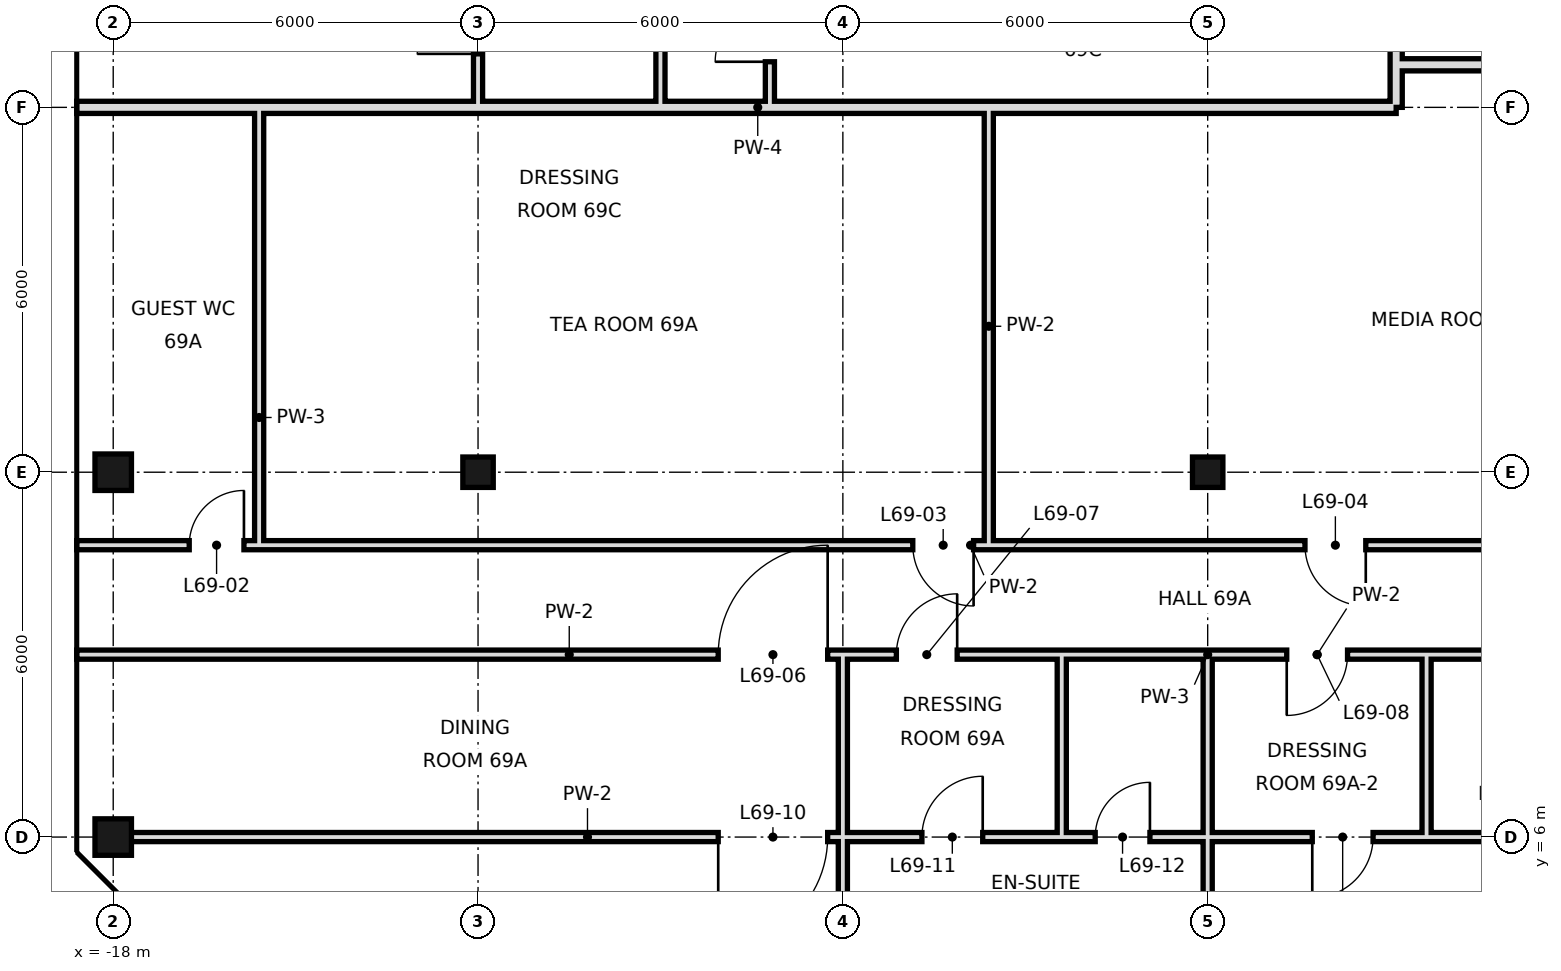
"""IFC4 building model, lengths in metres.
Left out: names, types, materials, properties, quantities, classifications, styles, units other than length and angle.
Written with IfcOpenShell. Run it as: python <this file> out.ifc"""

import sys

from ifc_helpers import new_model, si_unit, direction, frame, frame_2d, origin, origin_2d, place, context, subcontext, project, spatial, rectangle, hollow_rectangle, extrude, element, fill, save


model = new_model("IFC4")
c1 = context("Model", 3, precision=1e-05, world=origin(), true_north=direction((0.0, 1.0)))
c2 = subcontext(c1, "Body", "Model", "MODEL_VIEW")
j1 = project(units=[si_unit("LENGTHUNIT", "METRE"), si_unit("PLANEANGLEUNIT", "RADIAN")], contexts=[c1])
p1 = place(None, origin())
s1 = spatial("IfcSite", under=j1, at=p1, CompositionType="ELEMENT")
p2 = place(p1, origin())
s2 = spatial("IfcBuilding", under=s1, at=p2, CompositionType="ELEMENT")
p3 = place(p2, frame((0.0, 0.0, 294.4)))
s3 = spatial("IfcBuildingStorey", under=s2, at=p3, CompositionType="ELEMENT", Elevation=294.4)
for number, where, z_axis, x_axis in (
    (1, (-18.0, 6.0, 0.0), (0.0, 0.0, 1.0), (1.0, 0.0, 0.0)),
    (2, (-18.0, 12.0, 0.0), (0.0, 0.0, 1.0), (1.0, 0.0, 0.0)),
):
    element("IfcColumn", number, at=place(p3, frame(where, z_axis=z_axis, x_axis=x_axis)), inside=s3, PredefinedType="COLUMN", context=c2, shape_type="SweptSolid", body=[
        extrude(hollow_rectangle(XDim=0.6, YDim=0.6, WallThickness=0.028, at=origin_2d()), origin(), (0.0, 0.0, 1.0), 3.6),
    ])
for number, where, z_axis, x_axis in (
    (3, (-12.0, 12.0, 0.0), (0.0, 0.0, 1.0), (1.0, 0.0, 0.0)),
    (4, (0.0, 12.0, 0.0), (0.0, 0.0, 1.0), (1.0, 0.0, 0.0)),
):
    element("IfcColumn", number, at=place(p3, frame(where, z_axis=z_axis, x_axis=x_axis)), inside=s3, PredefinedType="COLUMN", context=c2, shape_type="SweptSolid", body=[
        extrude(hollow_rectangle(XDim=0.5, YDim=0.5, WallThickness=0.025, at=origin_2d()), origin(), (0.0, 0.0, 1.0), 3.6),
    ])
p4 = place(p3, frame((-12.0, 18.0, 0.0), z_axis=(0.0, 0.0, 1.0), x_axis=(0.0, 1.0, 0.0)))
e5 = element("IfcWall", 5, at=p4, inside=s3, PredefinedType="PARTITIONING", context=c2, shape_type="SweptSolid", body=[
    extrude(rectangle(XDim=3.6, YDim=0.15, at=frame_2d((1.8, 0.0))), origin(), (0.0, 0.0, 1.0), 2.72),
])
p5 = place(p4, frame((0.88, 0.0, 0.0)))
e6 = element("IfcOpeningElement", 6, at=p5, cuts=e5, PredefinedType="OPENING", context=c2, shape_type="SweptSolid", body=[
    extrude(rectangle(XDim=1.0, YDim=2.4, at=frame_2d((0.5, 1.2))), frame((0.0, 0.085, 0.0), z_axis=(0.0, -1.0, 0.0), x_axis=(1.0, 0.0, 0.0)), (0.0, 0.0, 1.0), 0.17),
])
p6 = place(p3, frame((-15.6, 10.8, 0.0), z_axis=(0.0, 0.0, 1.0), x_axis=(0.0, 1.0, 0.0)))
e7 = element("IfcWall", 7, at=p6, inside=s3, PredefinedType="PARTITIONING", context=c2, shape_type="SweptSolid", body=[
    extrude(rectangle(XDim=7.2, YDim=0.15, at=frame_2d((3.6, 0.0))), origin(), (0.0, 0.0, 1.0), 3.42),
])
p7 = place(p3, frame((-2.4, 6.0, 0.0), z_axis=(0.0, 0.0, 1.0), x_axis=(0.0, 1.0, 0.0)))
e8 = element("IfcWall", 8, at=p7, inside=s3, PredefinedType="PARTITIONING", context=c2, shape_type="SweptSolid", body=[
    extrude(rectangle(XDim=3.0, YDim=0.15, at=frame_2d((1.5, 0.0))), origin(), (0.0, 0.0, 1.0), 3.42),
])
p8 = place(p3, frame((-3.6, 10.8, 0.0), z_axis=(0.0, 0.0, 1.0), x_axis=(0.0, 1.0, 0.0)))
e9 = element("IfcWall", 9, at=p8, inside=s3, PredefinedType="PARTITIONING", context=c2, shape_type="SweptSolid", body=[
    extrude(rectangle(XDim=7.2, YDim=0.15, at=frame_2d((3.6, 0.0))), origin(), (0.0, 0.0, 1.0), 3.42),
])
p9 = place(p3, frame((-6.0, -0.6, 0.0), z_axis=(0.0, 0.0, 1.0), x_axis=(0.0, 1.0, 0.0)))
e10 = element("IfcWall", 10, at=p9, inside=s3, PredefinedType="PARTITIONING", context=c2, shape_type="SweptSolid", body=[
    extrude(rectangle(XDim=9.6, YDim=0.15, at=frame_2d((4.8, 0.0))), origin(), (0.0, 0.0, 1.0), 3.42),
])
p10 = place(p3, frame((-7.2, 18.0, 0.0), z_axis=(0.0, 0.0, 1.0), x_axis=(0.0, 1.0, 0.0)))
e11 = element("IfcWall", 11, at=p10, inside=s3, PredefinedType="PARTITIONING", context=c2, shape_type="SweptSolid", body=[
    extrude(rectangle(XDim=2.4, YDim=0.15, at=frame_2d((1.2, 0.0))), origin(), (0.0, 0.0, 1.0), 3.42),
])
p11 = place(p10, frame((0.75, 0.0, 0.0)))
e12 = element("IfcOpeningElement", 12, at=p11, cuts=e11, PredefinedType="OPENING", context=c2, shape_type="SweptSolid", body=[
    extrude(rectangle(XDim=0.9, YDim=2.4, at=frame_2d((0.45, 1.2))), frame((0.0, 0.085, 0.0), z_axis=(0.0, -1.0, 0.0), x_axis=(1.0, 0.0, 0.0)), (0.0, 0.0, 1.0), 0.17),
])
p12 = place(p3, frame((-9.0, 18.0, 0.0), z_axis=(0.0, 0.0, 1.0), x_axis=(0.0, 1.0, 0.0)))
e13 = element("IfcWall", 13, at=p12, inside=s3, PredefinedType="PARTITIONING", context=c2, shape_type="SweptSolid", body=[
    extrude(rectangle(XDim=3.6, YDim=0.15, at=frame_2d((1.8, 0.0))), origin(), (0.0, 0.0, 1.0), 3.42),
])
p13 = place(p12, frame((1.3, 0.0, 0.0)))
e14 = element("IfcOpeningElement", 14, at=p13, cuts=e13, PredefinedType="OPENING", context=c2, shape_type="SweptSolid", body=[
    extrude(rectangle(XDim=1.0, YDim=2.4, at=frame_2d((0.5, 1.2))), frame((0.0, 0.085, 0.0), z_axis=(0.0, -1.0, 0.0), x_axis=(1.0, 0.0, 0.0)), (0.0, 0.0, 1.0), 0.17),
])
p14 = place(p3, frame((0.0, 0.0, 0.0), z_axis=(0.0, 0.0, 1.0), x_axis=(0.0, 1.0, 0.0)))
e15 = element("IfcWall", 15, at=p14, inside=s3, PredefinedType="PARTITIONING", context=c2, shape_type="SweptSolid", body=[
    extrude(rectangle(XDim=6.0, YDim=0.15, at=frame_2d((3.0, 0.0))), origin(), (0.0, 0.0, 1.0), 2.72),
])
p15 = place(p3, frame((0.0, 6.0, 0.0), z_axis=(0.0, 0.0, 1.0), x_axis=(0.0, 1.0, 0.0)))
e16 = element("IfcWall", 16, at=p15, inside=s3, PredefinedType="PARTITIONING", context=c2, shape_type="SweptSolid", body=[
    extrude(rectangle(XDim=3.0, YDim=0.15, at=frame_2d((1.5, 0.0))), origin(), (0.0, 0.0, 1.0), 2.72),
])
p16 = place(p3, frame((3.1, 18.7, 0.0), z_axis=(0.0, 0.0, 1.0), x_axis=(0.0, 1.0, 0.0)))
e17 = element("IfcWall", 17, at=p16, inside=s3, PredefinedType="SOLIDWALL", context=c2, shape_type="SweptSolid", body=[
    extrude(rectangle(XDim=25.1, YDim=0.2, at=frame_2d((12.55, 0.0))), origin(), (0.0, 0.0, 1.0), 2.97),
])
p17 = place(p16, frame((3.28, 0.0, 0.0)))
e18 = element("IfcOpeningElement", 18, at=p17, cuts=e17, PredefinedType="OPENING", context=c2, shape_type="SweptSolid", body=[
    extrude(rectangle(XDim=1.2, YDim=2.4, at=frame_2d((0.6, 1.2))), frame((0.0, 0.11, 0.0), z_axis=(0.0, -1.0, 0.0), x_axis=(1.0, 0.0, 0.0)), (0.0, 0.0, 1.0), 0.22),
])
p18 = place(p3, frame((3.1, 18.0, 0.0), z_axis=(0.0, 0.0, 1.0), x_axis=(0.0, 1.0, 0.0)))
e19 = element("IfcWall", 19, at=p18, inside=s3, PredefinedType="SOLIDWALL", context=c2, shape_type="SweptSolid", body=[
    extrude(rectangle(XDim=0.7, YDim=0.2, at=frame_2d((0.35, 0.0))), origin(), (0.0, 0.0, 1.0), 2.97),
])
p19 = place(p3, frame((3.6, 6.0, 0.0), z_axis=(0.0, 0.0, 1.0), x_axis=(0.0, 1.0, 0.0)))
e20 = element("IfcWall", 20, at=p19, inside=s3, PredefinedType="PARTITIONING", context=c2, shape_type="SweptSolid", body=[
    extrude(rectangle(XDim=3.0, YDim=0.15, at=frame_2d((1.5, 0.0))), origin(), (0.0, 0.0, 1.0), 3.42),
])
p20 = place(p3, frame((-15.6, 10.8, 0.0), z_axis=(0.0, 0.0, 1.0), x_axis=(1.0, 0.0, 0.0)))
e21 = element("IfcWall", 21, at=p20, inside=s3, PredefinedType="PARTITIONING", context=c2, shape_type="SweptSolid", body=[
    extrude(rectangle(XDim=23.4, YDim=0.15, at=frame_2d((11.7, 0.0))), origin(), (0.0, 0.0, 1.0), 3.42),
])
p21 = place(p20, frame((10.75, 0.0, 0.0)))
e22 = element("IfcOpeningElement", 22, at=p21, cuts=e21, PredefinedType="OPENING", context=c2, shape_type="SweptSolid", body=[
    extrude(rectangle(XDim=1.0, YDim=2.4, at=frame_2d((0.5, 1.2))), frame((0.0, 0.085, 0.0), z_axis=(0.0, -1.0, 0.0), x_axis=(1.0, 0.0, 0.0)), (0.0, 0.0, 1.0), 0.17),
])
p22 = place(p20, frame((17.2, 0.0, 0.0)))
e23 = element("IfcOpeningElement", 23, at=p22, cuts=e21, PredefinedType="OPENING", context=c2, shape_type="SweptSolid", body=[
    extrude(rectangle(XDim=1.0, YDim=2.4, at=frame_2d((0.5, 1.2))), frame((0.0, 0.085, 0.0), z_axis=(0.0, -1.0, 0.0), x_axis=(1.0, 0.0, 0.0)), (0.0, 0.0, 1.0), 0.17),
])
p23 = place(p3, frame((-18.6, 10.8, 0.0), z_axis=(0.0, 0.0, 1.0), x_axis=(1.0, 0.0, 0.0)))
e24 = element("IfcWall", 24, at=p23, inside=s3, PredefinedType="PARTITIONING", context=c2, shape_type="SweptSolid", body=[
    extrude(rectangle(XDim=3.0, YDim=0.15, at=frame_2d((1.5, 0.0))), origin(), (0.0, 0.0, 1.0), 3.42),
])
p24 = place(p23, frame((1.85, 0.0, 0.0)))
e25 = element("IfcOpeningElement", 25, at=p24, cuts=e24, PredefinedType="OPENING", context=c2, shape_type="SweptSolid", body=[
    extrude(rectangle(XDim=0.9, YDim=2.4, at=frame_2d((0.45, 1.2))), frame((0.0, 0.085, 0.0), z_axis=(0.0, -1.0, 0.0), x_axis=(1.0, 0.0, 0.0)), (0.0, 0.0, 1.0), 0.17),
])
p25 = place(p3, frame((-18.6, 18.0, 0.0), z_axis=(0.0, 0.0, 1.0), x_axis=(1.0, 0.0, 0.0)))
e26 = element("IfcWall", 26, at=p25, inside=s3, PredefinedType="SOLIDWALL", context=c2, shape_type="SweptSolid", body=[
    extrude(rectangle(XDim=21.7, YDim=0.2, at=frame_2d((10.85, 0.0))), origin(), (0.0, 0.0, 1.0), 2.72),
])
p26 = place(p3, frame((3.1, 18.7, 0.0), z_axis=(0.0, 0.0, 1.0), x_axis=(1.0, 0.0, 0.0)))
e27 = element("IfcWall", 27, at=p26, inside=s3, PredefinedType="SOLIDWALL", context=c2, shape_type="SweptSolid", body=[
    extrude(rectangle(XDim=4.7, YDim=0.2, at=frame_2d((2.35, 0.0))), origin(), (0.0, 0.0, 1.0), 2.72),
])
p27 = place(p3, frame((-18.0, 6.0, 0.0), z_axis=(0.0, 0.0, 1.0), x_axis=(1.0, 0.0, 0.0)))
e28 = element("IfcWall", 28, at=p27, inside=s3, PredefinedType="PARTITIONING", context=c2, shape_type="SweptSolid", body=[
    extrude(rectangle(XDim=15.6, YDim=0.15, at=frame_2d((7.8, 0.0))), origin(), (0.0, 0.0, 1.0), 2.72),
])
p28 = place(p27, frame((9.95, 0.0, 0.0)))
e29 = element("IfcOpeningElement", 29, at=p28, cuts=e28, PredefinedType="OPENING", context=c2, shape_type="SweptSolid", body=[
    extrude(rectangle(XDim=1.8, YDim=2.4, at=frame_2d((0.9, 1.2))), frame((0.0, 0.085, 0.0), z_axis=(0.0, -1.0, 0.0), x_axis=(1.0, 0.0, 0.0)), (0.0, 0.0, 1.0), 0.17),
])
p29 = place(p27, frame((13.3, 0.0, 0.0)))
e30 = element("IfcOpeningElement", 30, at=p29, cuts=e28, PredefinedType="OPENING", context=c2, shape_type="SweptSolid", body=[
    extrude(rectangle(XDim=1.0, YDim=2.4, at=frame_2d((0.5, 1.2))), frame((0.0, 0.085, 0.0), z_axis=(0.0, -1.0, 0.0), x_axis=(1.0, 0.0, 0.0)), (0.0, 0.0, 1.0), 0.17),
])
p30 = place(p3, frame((0.0, 6.0, 0.0), z_axis=(0.0, 0.0, 1.0), x_axis=(1.0, 0.0, 0.0)))
e31 = element("IfcWall", 31, at=p30, inside=s3, PredefinedType="PARTITIONING", context=c2, shape_type="SweptSolid", body=[
    extrude(rectangle(XDim=3.6, YDim=0.15, at=frame_2d((1.8, 0.0))), origin(), (0.0, 0.0, 1.0), 2.72),
])
p31 = place(p30, frame((1.72, 0.0, 0.0)))
e32 = element("IfcOpeningElement", 32, at=p31, cuts=e31, PredefinedType="OPENING", context=c2, shape_type="SweptSolid", body=[
    extrude(rectangle(XDim=1.0, YDim=2.4, at=frame_2d((0.5, 1.2))), frame((0.0, 0.085, 0.0), z_axis=(0.0, -1.0, 0.0), x_axis=(1.0, 0.0, 0.0)), (0.0, 0.0, 1.0), 0.17),
])
p32 = place(p3, frame((-2.4, 6.0, 0.0), z_axis=(0.0, 0.0, 1.0), x_axis=(1.0, 0.0, 0.0)))
e33 = element("IfcWall", 33, at=p32, inside=s3, PredefinedType="PARTITIONING", context=c2, shape_type="SweptSolid", body=[
    extrude(rectangle(XDim=2.4, YDim=0.15, at=frame_2d((1.2, 0.0))), origin(), (0.0, 0.0, 1.0), 2.72),
])
p33 = place(p32, frame((0.55, 0.0, 0.0)))
e34 = element("IfcOpeningElement", 34, at=p33, cuts=e33, PredefinedType="OPENING", context=c2, shape_type="SweptSolid", body=[
    extrude(rectangle(XDim=0.9, YDim=2.4, at=frame_2d((0.45, 1.2))), frame((0.0, 0.085, 0.0), z_axis=(0.0, -1.0, 0.0), x_axis=(1.0, 0.0, 0.0)), (0.0, 0.0, 1.0), 0.17),
])
p34 = place(p3, frame((3.6, 6.0, 0.0), z_axis=(0.0, 0.0, 1.0), x_axis=(1.0, 0.0, 0.0)))
e35 = element("IfcWall", 35, at=p34, inside=s3, PredefinedType="PARTITIONING", context=c2, shape_type="SweptSolid", body=[
    extrude(rectangle(XDim=2.4, YDim=0.15, at=frame_2d((1.2, 0.0))), origin(), (0.0, 0.0, 1.0), 2.72),
])
p35 = place(p34, frame((0.95, 0.0, 0.0)))
e36 = element("IfcOpeningElement", 36, at=p35, cuts=e35, PredefinedType="OPENING", context=c2, shape_type="SweptSolid", body=[
    extrude(rectangle(XDim=0.9, YDim=2.4, at=frame_2d((0.45, 1.2))), frame((0.0, 0.085, 0.0), z_axis=(0.0, -1.0, 0.0), x_axis=(1.0, 0.0, 0.0)), (0.0, 0.0, 1.0), 0.17),
])
p36 = place(p3, frame((-18.6, 9.0, 0.0), z_axis=(0.0, 0.0, 1.0), x_axis=(1.0, 0.0, 0.0)))
e37 = element("IfcWall", 37, at=p36, inside=s3, PredefinedType="PARTITIONING", context=c2, shape_type="SweptSolid", body=[
    extrude(rectangle(XDim=16.2, YDim=0.15, at=frame_2d((8.1, 0.0))), origin(), (0.0, 0.0, 1.0), 3.42),
])
p37 = place(p36, frame((10.55, 0.0, 0.0)))
e38 = element("IfcOpeningElement", 38, at=p37, cuts=e37, PredefinedType="OPENING", context=c2, shape_type="SweptSolid", body=[
    extrude(rectangle(XDim=1.8, YDim=2.4, at=frame_2d((0.9, 1.2))), frame((0.0, 0.085, 0.0), z_axis=(0.0, -1.0, 0.0), x_axis=(1.0, 0.0, 0.0)), (0.0, 0.0, 1.0), 0.17),
])
p38 = place(p36, frame((13.48, 0.0, 0.0)))
e39 = element("IfcOpeningElement", 39, at=p38, cuts=e37, PredefinedType="OPENING", context=c2, shape_type="SweptSolid", body=[
    extrude(rectangle(XDim=1.0, YDim=2.4, at=frame_2d((0.5, 1.2))), frame((0.0, 0.085, 0.0), z_axis=(0.0, -1.0, 0.0), x_axis=(1.0, 0.0, 0.0)), (0.0, 0.0, 1.0), 0.17),
])
p39 = place(p3, frame((0.0, 9.0, 0.0), z_axis=(0.0, 0.0, 1.0), x_axis=(1.0, 0.0, 0.0)))
e40 = element("IfcWall", 40, at=p39, inside=s3, PredefinedType="PARTITIONING", context=c2, shape_type="SweptSolid", body=[
    extrude(rectangle(XDim=3.6, YDim=0.15, at=frame_2d((1.8, 0.0))), origin(), (0.0, 0.0, 1.0), 3.42),
])
p40 = place(p39, frame((1.3, 0.0, 0.0)))
e41 = element("IfcOpeningElement", 41, at=p40, cuts=e40, PredefinedType="OPENING", context=c2, shape_type="SweptSolid", body=[
    extrude(rectangle(XDim=1.0, YDim=2.4, at=frame_2d((0.5, 1.2))), frame((0.0, 0.085, 0.0), z_axis=(0.0, -1.0, 0.0), x_axis=(1.0, 0.0, 0.0)), (0.0, 0.0, 1.0), 0.17),
])
for number, where, z_axis, x_axis in (
    (42, (-2.4, 9.0, 0.0), (0.0, 0.0, 1.0), (1.0, 0.0, 0.0)),
    (43, (3.6, 9.0, 0.0), (0.0, 0.0, 1.0), (1.0, 0.0, 0.0)),
):
    element("IfcWall", number, at=place(p3, frame(where, z_axis=z_axis, x_axis=x_axis)), inside=s3, PredefinedType="PARTITIONING", context=c2, shape_type="SweptSolid", body=[
        extrude(rectangle(XDim=2.4, YDim=0.15, at=frame_2d((1.2, 0.0))), origin(), (0.0, 0.0, 1.0), 3.42),
    ])
p41 = place(p24, frame((0.9, 0.0, 0.0), z_axis=(0.0, 0.0, 1.0), x_axis=(-1.0, 0.0, 0.0)))
e44 = element("IfcDoor", 44, at=p41, inside=s3, OperationType="SINGLE_SWING_LEFT", PredefinedType="DOOR", context=c2, shape_type="SweptSolid", body=[
    extrude(rectangle(XDim=0.9, YDim=2.4, at=frame_2d((0.45, 1.2))), frame((0.0, 0.025, 0.0), z_axis=(0.0, -1.0, 0.0), x_axis=(1.0, 0.0, 0.0)), (0.0, 0.0, 1.0), 0.05),
])
fill(e25, e44)
p42 = place(p21, origin())
e45 = element("IfcDoor", 45, at=p42, inside=s3, OperationType="SINGLE_SWING_RIGHT", PredefinedType="DOOR", context=c2, shape_type="SweptSolid", body=[
    extrude(rectangle(XDim=1.0, YDim=2.4, at=frame_2d((0.5, 1.2))), frame((0.0, 0.025, 0.0), z_axis=(0.0, -1.0, 0.0), x_axis=(1.0, 0.0, 0.0)), (0.0, 0.0, 1.0), 0.05),
])
fill(e22, e45)
p43 = place(p22, origin())
e46 = element("IfcDoor", 46, at=p43, inside=s3, OperationType="SINGLE_SWING_RIGHT", PredefinedType="DOOR", context=c2, shape_type="SweptSolid", body=[
    extrude(rectangle(XDim=1.0, YDim=2.4, at=frame_2d((0.5, 1.2))), frame((0.0, 0.025, 0.0), z_axis=(0.0, -1.0, 0.0), x_axis=(1.0, 0.0, 0.0)), (0.0, 0.0, 1.0), 0.05),
])
fill(e23, e46)
p44 = place(p37, frame((1.8, 0.0, 0.0), z_axis=(0.0, 0.0, 1.0), x_axis=(-1.0, 0.0, 0.0)))
e47 = element("IfcDoor", 47, at=p44, inside=s3, OperationType="SINGLE_SWING_LEFT", PredefinedType="DOOR", context=c2, shape_type="SweptSolid", body=[
    extrude(rectangle(XDim=1.8, YDim=2.4, at=frame_2d((0.9, 1.2))), frame((0.0, 0.025, 0.0), z_axis=(0.0, -1.0, 0.0), x_axis=(1.0, 0.0, 0.0)), (0.0, 0.0, 1.0), 0.05),
])
fill(e38, e47)
p45 = place(p38, frame((1.0, 0.0, 0.0), z_axis=(0.0, 0.0, 1.0), x_axis=(-1.0, 0.0, 0.0)))
e48 = element("IfcDoor", 48, at=p45, inside=s3, OperationType="SINGLE_SWING_LEFT", PredefinedType="DOOR", context=c2, shape_type="SweptSolid", body=[
    extrude(rectangle(XDim=1.0, YDim=2.4, at=frame_2d((0.5, 1.2))), frame((0.0, 0.025, 0.0), z_axis=(0.0, -1.0, 0.0), x_axis=(1.0, 0.0, 0.0)), (0.0, 0.0, 1.0), 0.05),
])
fill(e39, e48)
p46 = place(p40, frame((1.0, 0.0, 0.0), z_axis=(0.0, 0.0, 1.0), x_axis=(-1.0, 0.0, 0.0)))
e49 = element("IfcDoor", 49, at=p46, inside=s3, OperationType="SINGLE_SWING_RIGHT", PredefinedType="DOOR", context=c2, shape_type="SweptSolid", body=[
    extrude(rectangle(XDim=1.0, YDim=2.4, at=frame_2d((0.5, 1.2))), frame((0.0, 0.025, 0.0), z_axis=(0.0, -1.0, 0.0), x_axis=(1.0, 0.0, 0.0)), (0.0, 0.0, 1.0), 0.05),
])
fill(e41, e49)
p47 = place(p28, frame((1.8, 0.0, 0.0), z_axis=(0.0, 0.0, 1.0), x_axis=(-1.0, 0.0, 0.0)))
e50 = element("IfcDoor", 50, at=p47, inside=s3, OperationType="SINGLE_SWING_RIGHT", PredefinedType="DOOR", context=c2, shape_type="SweptSolid", body=[
    extrude(rectangle(XDim=1.8, YDim=2.4, at=frame_2d((0.9, 1.2))), frame((0.0, 0.025, 0.0), z_axis=(0.0, -1.0, 0.0), x_axis=(1.0, 0.0, 0.0)), (0.0, 0.0, 1.0), 0.05),
])
fill(e29, e50)
p48 = place(p29, frame((1.0, 0.0, 0.0), z_axis=(0.0, 0.0, 1.0), x_axis=(-1.0, 0.0, 0.0)))
e51 = element("IfcDoor", 51, at=p48, inside=s3, OperationType="SINGLE_SWING_LEFT", PredefinedType="DOOR", context=c2, shape_type="SweptSolid", body=[
    extrude(rectangle(XDim=1.0, YDim=2.4, at=frame_2d((0.5, 1.2))), frame((0.0, 0.025, 0.0), z_axis=(0.0, -1.0, 0.0), x_axis=(1.0, 0.0, 0.0)), (0.0, 0.0, 1.0), 0.05),
])
fill(e30, e51)
p49 = place(p33, frame((0.9, 0.0, 0.0), z_axis=(0.0, 0.0, 1.0), x_axis=(-1.0, 0.0, 0.0)))
e52 = element("IfcDoor", 52, at=p49, inside=s3, OperationType="SINGLE_SWING_LEFT", PredefinedType="DOOR", context=c2, shape_type="SweptSolid", body=[
    extrude(rectangle(XDim=0.9, YDim=2.4, at=frame_2d((0.45, 1.2))), frame((0.0, 0.025, 0.0), z_axis=(0.0, -1.0, 0.0), x_axis=(1.0, 0.0, 0.0)), (0.0, 0.0, 1.0), 0.05),
])
fill(e34, e52)
p50 = place(p31, frame((1.0, 0.0, 0.0), z_axis=(0.0, 0.0, 1.0), x_axis=(-1.0, 0.0, 0.0)))
e53 = element("IfcDoor", 53, at=p50, inside=s3, OperationType="SINGLE_SWING_RIGHT", PredefinedType="DOOR", context=c2, shape_type="SweptSolid", body=[
    extrude(rectangle(XDim=1.0, YDim=2.4, at=frame_2d((0.5, 1.2))), frame((0.0, 0.025, 0.0), z_axis=(0.0, -1.0, 0.0), x_axis=(1.0, 0.0, 0.0)), (0.0, 0.0, 1.0), 0.05),
])
fill(e32, e53)
p51 = place(p11, origin())
e54 = element("IfcDoor", 54, at=p51, inside=s3, OperationType="SINGLE_SWING_LEFT", PredefinedType="DOOR", context=c2, shape_type="SweptSolid", body=[
    extrude(rectangle(XDim=0.9, YDim=2.4, at=frame_2d((0.45, 1.2))), frame((0.0, 0.025, 0.0), z_axis=(0.0, -1.0, 0.0), x_axis=(1.0, 0.0, 0.0)), (0.0, 0.0, 1.0), 0.05),
])
fill(e12, e54)
p52 = place(p5, origin())
e55 = element("IfcDoor", 55, at=p52, inside=s3, OperationType="SINGLE_SWING_LEFT", PredefinedType="DOOR", context=c2, shape_type="SweptSolid", body=[
    extrude(rectangle(XDim=1.0, YDim=2.4, at=frame_2d((0.5, 1.2))), frame((0.0, 0.025, 0.0), z_axis=(0.0, -1.0, 0.0), x_axis=(1.0, 0.0, 0.0)), (0.0, 0.0, 1.0), 0.05),
])
fill(e6, e55)
save(model, sys.argv[1])
